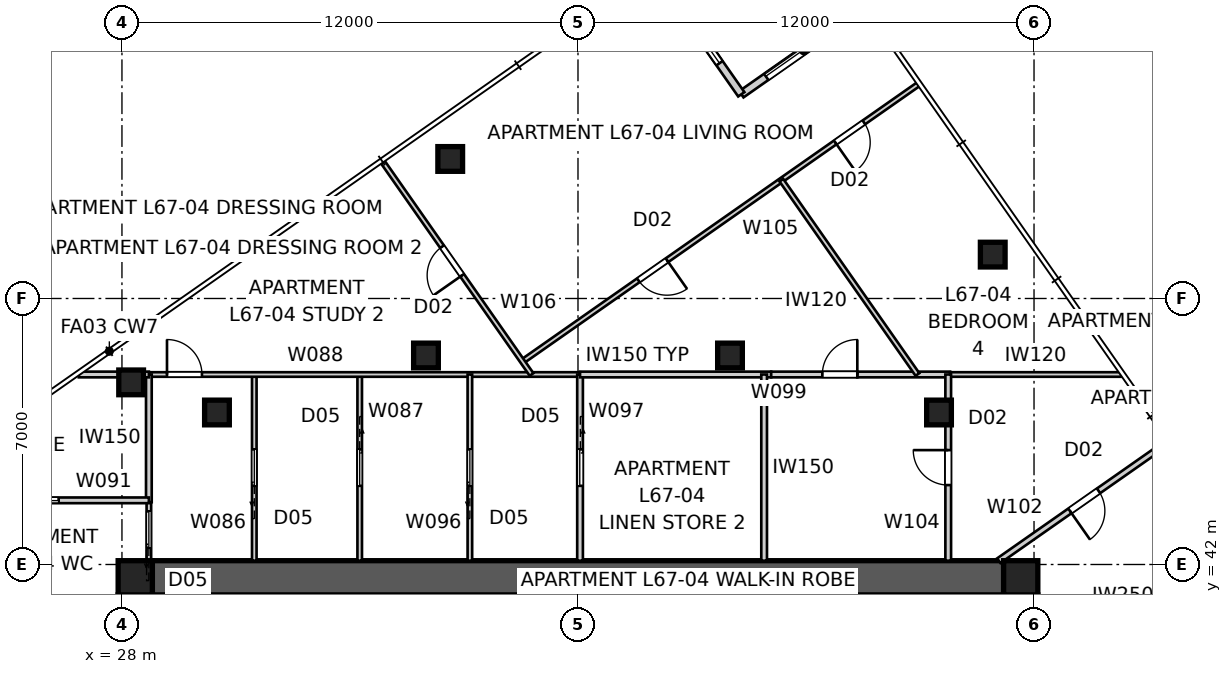
"""IFC4 building model, lengths in metres.
Left out: names, types, materials, properties, quantities, classifications, styles, units other than length and angle.
Written with IfcOpenShell. Run it as: python <this file> out.ifc"""

import sys

from ifc_helpers import new_model, si_unit, direction, frame, frame_2d, origin, origin_2d, place, context, subcontext, project, spatial, polyline, rectangle, outline, extrude, element, fill, save


model = new_model("IFC4")
c1 = context("Model", 3, precision=1e-05, world=origin(), true_north=direction((0.0, 1.0)))
c2 = subcontext(c1, "Body", "Model", "MODEL_VIEW")
j1 = project(units=[si_unit("LENGTHUNIT", "METRE"), si_unit("PLANEANGLEUNIT", "RADIAN")], contexts=[c1])
p1 = place(None, origin())
s1 = spatial("IfcSite", under=j1, at=p1, CompositionType="ELEMENT")
p2 = place(p1, origin())
s2 = spatial("IfcBuilding", under=s1, at=p2, CompositionType="ELEMENT")
p3 = place(p2, frame((0.0, 0.0, 243.8)))
s3 = spatial("IfcBuildingStorey", under=s2, at=p3, CompositionType="ELEMENT", Elevation=243.8)
p4 = place(p3, frame((28.8, 41.65, 0.0), z_axis=(0.0, 0.0, 1.0), x_axis=(1.0, 0.0, 0.0)))
e1 = element("IfcWall", 1, at=p4, inside=s3, PredefinedType="SHEAR", context=c2, shape_type="SweptSolid", body=[
    extrude(outline(polyline([(0.0, -0.45), (22.4, -0.45), (22.4, -0.025), (22.85, -0.025), (22.85, 0.025), (22.4, 0.025), (22.4, 0.45), (0.0, 0.45), (0.0, 0.025), (-0.45, 0.025), (-0.45, -0.025), (0.0, -0.025), (0.0, -0.45)])), origin(), (0.0, 0.0, 1.0), 3.4),
])
p5 = place(p3, frame((51.65, 18.8, 0.0), z_axis=(0.0, 0.0, 1.0), x_axis=(0.0, 1.0, 0.0)))
e2 = element("IfcWall", 2, at=p5, inside=s3, PredefinedType="SHEAR", context=c2, shape_type="SweptSolid", body=[
    extrude(outline(polyline([(0.0, -0.45), (22.4, -0.45), (22.4, -0.025), (22.85, -0.025), (22.85, 0.025), (22.4, 0.025), (22.4, 0.45), (0.0, 0.45), (0.0, 0.025), (-0.45, 0.025), (-0.45, -0.025), (0.0, -0.025), (0.0, -0.45)])), origin(), (0.0, 0.0, 1.0), 3.4),
])
p6 = place(p5, frame((11.14, 0.0, 0.0)))
e3 = element("IfcOpeningElement", 3, at=p6, cuts=e2, PredefinedType="OPENING", context=c2, shape_type="SweptSolid", body=[
    extrude(rectangle(XDim=1.02, YDim=2.4, at=frame_2d((0.51, 1.2))), frame((0.0, 0.46, 0.0), z_axis=(0.0, -1.0, 0.0), x_axis=(1.0, 0.0, 0.0)), (0.0, 0.0, 1.0), 0.92),
])
p7 = place(p3, frame((28.35, 41.2, 0.0), z_axis=(0.0, 0.0, 1.0), x_axis=(0.0, -1.0, 0.0)))
e4 = element("IfcWall", 4, at=p7, inside=s3, PredefinedType="SHEAR", context=c2, shape_type="SweptSolid", body=[
    extrude(outline(polyline([(0.0, -0.45), (22.4, -0.45), (22.4, -0.025), (22.85, -0.025), (22.85, 0.025), (22.4, 0.025), (22.4, 0.45), (0.0, 0.45), (0.0, 0.025), (-0.45, 0.025), (-0.45, -0.025), (0.0, -0.025), (0.0, -0.45)])), origin(), (0.0, 0.0, 1.0), 3.4),
])
p8 = place(p7, frame((11.14, 0.0, 0.0)))
e5 = element("IfcOpeningElement", 5, at=p8, cuts=e4, PredefinedType="OPENING", context=c2, shape_type="SweptSolid", body=[
    extrude(rectangle(XDim=1.02, YDim=2.4, at=frame_2d((0.51, 1.2))), frame((0.0, 0.46, 0.0), z_axis=(0.0, -1.0, 0.0), x_axis=(1.0, 0.0, 0.0)), (0.0, 0.0, 1.0), 0.92),
])
for number, where, z_axis, x_axis in (
    (6, (51.65, 41.65, 0.0), (0.0, 0.0, 1.0), (1.0, 0.0, 0.0)),
    (7, (28.35, 41.65, 0.0), (0.0, 0.0, 1.0), (1.0, 0.0, 0.0)),
):
    element("IfcColumn", number, at=place(p3, frame(where, z_axis=z_axis, x_axis=x_axis)), inside=s3, PredefinedType="COLUMN", context=c2, shape_type="SweptSolid", body=[
        extrude(rectangle(XDim=0.9, YDim=0.9, at=origin_2d()), origin(), (0.0, 0.0, 1.0), 3.4),
    ])
for number, where, z_axis, x_axis in (
    (8, (50.914, 50.155, 0.0), (0.0, 0.0, 1.0), (1.0, 0.0, 0.0)),
    (9, (36.638, 52.672, 0.0), (0.0, 0.0, 1.0), (1.0, 0.0, 0.0)),
    (10, (28.242, 46.793, 0.0), (0.0, 0.0, 1.0), (1.0, 0.0, 0.0)),
    (11, (49.5, 46.0, 0.0), (0.0, 0.0, 1.0), (1.0, 0.0, 0.0)),
    (12, (44.0, 47.5, 0.0), (0.0, 0.0, 1.0), (1.0, 0.0, 0.0)),
    (13, (36.0, 47.5, 0.0), (0.0, 0.0, 1.0), (1.0, 0.0, 0.0)),
    (14, (30.5, 46.0, 0.0), (0.0, 0.0, 1.0), (1.0, 0.0, 0.0)),
):
    element("IfcColumn", number, at=place(p3, frame(where, z_axis=z_axis, x_axis=x_axis)), inside=s3, PredefinedType="COLUMN", context=c2, shape_type="SweptSolid", body=[
        extrude(rectangle(XDim=0.65, YDim=0.65, at=origin_2d()), origin(), (0.0, 0.0, 1.0), 3.4),
    ])
p9 = place(p3, frame((47.574, 56.667, 0.0), z_axis=(0.0, 0.0, 1.0), x_axis=(-0.819165963305, -0.573556557423, 0.0)))
e15 = element("IfcWall", 15, at=p9, inside=s3, PredefinedType="SOLIDWALL", context=c2, shape_type="SweptSolid", body=[
    extrude(rectangle(XDim=4.0, YDim=0.2, at=frame_2d((2.0, 0.0))), origin(), (0.0, 0.0, 1.0), 3.25),
])
p10 = place(p9, frame((0.8, 0.0, 0.0)))
e16 = element("IfcOpeningElement", 16, at=p10, cuts=e15, PredefinedType="OPENING", context=c2, shape_type="SweptSolid", body=[
    extrude(rectangle(XDim=2.4, YDim=2.1, at=frame_2d((1.2, 1.05))), frame((0.0, 0.11, 0.0), z_axis=(0.0, -1.0, 0.0), x_axis=(1.0, 0.0, 0.0)), (0.0, 0.0, 1.0), 0.22),
])
p11 = place(p3, frame((44.298, 54.373, 0.0), z_axis=(0.0, 0.0, 1.0), x_axis=(-0.573597512525, 0.819137286189, 0.0)))
e17 = element("IfcWall", 17, at=p11, inside=s3, PredefinedType="SOLIDWALL", context=c2, shape_type="SweptSolid", body=[
    extrude(rectangle(XDim=4.0, YDim=0.2, at=frame_2d((2.0, 0.0))), origin(), (0.0, 0.0, 1.0), 3.25),
])
p12 = place(p11, frame((1.0, 0.0, 0.45)))
e18 = element("IfcOpeningElement", 18, at=p12, cuts=e17, PredefinedType="OPENING", context=c2, shape_type="SweptSolid", body=[
    extrude(rectangle(XDim=2.0, YDim=1.8, at=frame_2d((1.0, 0.9))), frame((0.0, 0.11, 0.0), z_axis=(0.0, -1.0, 0.0), x_axis=(1.0, 0.0, 0.0)), (0.0, 0.0, 1.0), 0.22),
])
p13 = place(p3, frame((57.612, 42.332, 0.0), z_axis=(0.0, 0.0, 1.0), x_axis=(-0.819161528122, -0.573562891796, 0.0)))
e19 = element("IfcWall", 19, at=p13, inside=s3, PredefinedType="PARTITIONING", context=c2, shape_type="SweptSolid", body=[
    extrude(rectangle(XDim=6.681, YDim=0.25, at=frame_2d((3.341, 0.0))), origin(), (0.0, 0.0, 1.0), 3.25),
])
p14 = place(p3, frame((31.482, 42.1, 0.0), z_axis=(0.0, 0.0, 1.0), x_axis=(0.0, 1.0, 0.0)))
e20 = element("IfcWall", 20, at=p14, inside=s3, PredefinedType="PARTITIONING", context=c2, shape_type="SweptSolid", body=[
    extrude(rectangle(XDim=4.9, YDim=0.12, at=frame_2d((2.45, 0.0))), origin(), (0.0, 0.0, 1.0), 3.25),
])
p15 = place(p14, frame((1.97, 0.0, 0.0)))
e21 = element("IfcOpeningElement", 21, at=p15, cuts=e20, PredefinedType="OPENING", context=c2, shape_type="SweptSolid", body=[
    extrude(rectangle(XDim=0.96, YDim=2.1, at=frame_2d((0.48, 1.05))), frame((0.0, 0.07, 0.0), z_axis=(0.0, -1.0, 0.0), x_axis=(1.0, 0.0, 0.0)), (0.0, 0.0, 1.0), 0.14),
])
p16 = place(p3, frame((34.256, 47.0, 0.0), z_axis=(0.0, 0.0, 1.0), x_axis=(0.0, -1.0, 0.0)))
e22 = element("IfcWall", 22, at=p16, inside=s3, PredefinedType="PARTITIONING", context=c2, shape_type="SweptSolid", body=[
    extrude(rectangle(XDim=4.9, YDim=0.12, at=frame_2d((2.45, 0.0))), origin(), (0.0, 0.0, 1.0), 2.796),
])
p17 = place(p16, frame((1.97, 0.0, 0.0)))
e23 = element("IfcOpeningElement", 23, at=p17, cuts=e22, PredefinedType="OPENING", context=c2, shape_type="SweptSolid", body=[
    extrude(rectangle(XDim=0.96, YDim=2.1, at=frame_2d((0.48, 1.05))), frame((0.0, 0.07, 0.0), z_axis=(0.0, -1.0, 0.0), x_axis=(1.0, 0.0, 0.0)), (0.0, 0.0, 1.0), 0.14),
])
p18 = place(p3, frame((28.708, 47.0, 0.0), z_axis=(0.0, 0.0, 1.0), x_axis=(1.0, 0.0, 0.0)))
e24 = element("IfcWall", 24, at=p18, inside=s3, PredefinedType="PARTITIONING", context=c2, shape_type="SweptSolid", body=[
    extrude(rectangle(XDim=11.346, YDim=0.12, at=frame_2d((5.673, 0.0))), origin(), (0.0, 0.0, 1.0), 2.55),
])
p19 = place(p18, frame((0.477, 0.0, 0.0)))
e25 = element("IfcOpeningElement", 25, at=p19, cuts=e24, PredefinedType="OPENING", context=c2, shape_type="SweptSolid", body=[
    extrude(rectangle(XDim=0.92, YDim=2.34, at=frame_2d((0.46, 1.17))), frame((0.0, 0.07, 0.0), z_axis=(0.0, -1.0, 0.0), x_axis=(1.0, 0.0, 0.0)), (0.0, 0.0, 1.0), 0.14),
])
p20 = place(p3, frame((28.708, 41.18, 0.0), z_axis=(0.0, 0.0, 1.0), x_axis=(0.0, 1.0, 0.0)))
e26 = element("IfcWall", 26, at=p20, inside=s3, PredefinedType="PARTITIONING", context=c2, shape_type="SweptSolid", body=[
    extrude(rectangle(XDim=2.458, YDim=0.12, at=frame_2d((1.229, 0.0))), origin(), (0.0, 0.0, 1.0), 3.25),
])
p21 = place(p20, frame((1.259, 0.0, 0.0)))
e27 = element("IfcOpeningElement", 27, at=p21, cuts=e26, PredefinedType="OPENING", context=c2, shape_type="SweptSolid", body=[
    extrude(rectangle(XDim=0.96, YDim=2.1, at=frame_2d((0.48, 1.05))), frame((0.0, 0.07, 0.0), z_axis=(0.0, -1.0, 0.0), x_axis=(1.0, 0.0, 0.0)), (0.0, 0.0, 1.0), 0.14),
])
p22 = place(p3, frame((28.708, 43.638, 0.0), z_axis=(0.0, 0.0, 1.0), x_axis=(0.0, 1.0, 0.0)))
e28 = element("IfcWall", 28, at=p22, inside=s3, PredefinedType="SOLIDWALL", context=c2, shape_type="SweptSolid", body=[
    extrude(rectangle(XDim=3.362, YDim=0.15, at=frame_2d((1.681, 0.0))), origin(), (0.0, 0.0, 1.0), 3.25),
])
p23 = place(p3, frame((23.0, 43.688, 0.0), z_axis=(0.0, 0.0, 1.0), x_axis=(1.0, 0.0, 0.0)))
e29 = element("IfcWall", 29, at=p23, inside=s3, PredefinedType="SOLIDWALL", context=c2, shape_type="SweptSolid", body=[
    extrude(rectangle(XDim=5.708, YDim=0.15, at=frame_2d((2.854, 0.0))), origin(), (0.0, 0.0, 1.0), 3.25),
])
p24 = place(p23, frame((2.374, 0.0, 0.0)))
e30 = element("IfcOpeningElement", 30, at=p24, cuts=e29, PredefinedType="OPENING", context=c2, shape_type="SweptSolid", body=[
    extrude(rectangle(XDim=0.96, YDim=2.1, at=frame_2d((0.48, 1.05))), frame((0.0, 0.085, 0.0), z_axis=(0.0, -1.0, 0.0), x_axis=(1.0, 0.0, 0.0)), (0.0, 0.0, 1.0), 0.17),
])
p25 = place(p3, frame((26.864, 47.0, 0.0), z_axis=(0.0, 0.0, 1.0), x_axis=(1.0, 0.0, 0.0)))
e31 = element("IfcWall", 31, at=p25, inside=s3, PredefinedType="SOLIDWALL", context=c2, shape_type="SweptSolid", body=[
    extrude(rectangle(XDim=1.844, YDim=0.15, at=frame_2d((0.922, 0.0))), origin(), (0.0, 0.0, 1.0), 3.25),
])
p26 = place(p3, frame((37.155, 42.1, 0.0), z_axis=(0.0, 0.0, 1.0), x_axis=(0.0, 1.0, 0.0)))
e32 = element("IfcWall", 32, at=p26, inside=s3, PredefinedType="PARTITIONING", context=c2, shape_type="SweptSolid", body=[
    extrude(rectangle(XDim=4.9, YDim=0.12, at=frame_2d((2.45, 0.0))), origin(), (0.0, 0.0, 1.0), 2.796),
])
p27 = place(p26, frame((1.97, 0.0, 0.0)))
e33 = element("IfcOpeningElement", 33, at=p27, cuts=e32, PredefinedType="OPENING", context=c2, shape_type="SweptSolid", body=[
    extrude(rectangle(XDim=0.96, YDim=2.1, at=frame_2d((0.48, 1.05))), frame((0.0, 0.07, 0.0), z_axis=(0.0, -1.0, 0.0), x_axis=(1.0, 0.0, 0.0)), (0.0, 0.0, 1.0), 0.14),
])
p28 = place(p3, frame((40.054, 47.0, 0.0), z_axis=(0.0, 0.0, 1.0), x_axis=(0.0, -1.0, 0.0)))
e34 = element("IfcWall", 34, at=p28, inside=s3, PredefinedType="SOLIDWALL", context=c2, shape_type="SweptSolid", body=[
    extrude(rectangle(XDim=4.9, YDim=0.15, at=frame_2d((2.45, 0.0))), origin(), (0.0, 0.0, 1.0), 2.796),
])
p29 = place(p28, frame((1.97, 0.0, 0.0)))
e35 = element("IfcOpeningElement", 35, at=p29, cuts=e34, PredefinedType="OPENING", context=c2, shape_type="SweptSolid", body=[
    extrude(rectangle(XDim=0.96, YDim=2.1, at=frame_2d((0.48, 1.05))), frame((0.0, 0.085, 0.0), z_axis=(0.0, -1.0, 0.0), x_axis=(1.0, 0.0, 0.0)), (0.0, 0.0, 1.0), 0.17),
])
p30 = place(p3, frame((40.054, 47.0, 0.0), z_axis=(0.0, 0.0, 1.0), x_axis=(1.0, 0.0, 0.0)))
e36 = element("IfcWall", 36, at=p30, inside=s3, PredefinedType="SOLIDWALL", context=c2, shape_type="SweptSolid", body=[
    extrude(rectangle(XDim=5.029, YDim=0.15, at=frame_2d((2.515, 0.0))), origin(), (0.0, 0.0, 1.0), 3.25),
])
p31 = place(p3, frame((45.083, 47.0, 0.0), z_axis=(0.0, 0.0, 1.0), x_axis=(1.0, 0.0, 0.0)))
e37 = element("IfcWall", 37, at=p31, inside=s3, PredefinedType="SOLIDWALL", context=c2, shape_type="SweptSolid", body=[
    extrude(rectangle(XDim=2.267, YDim=0.15, at=frame_2d((1.133, 0.0))), origin(), (0.0, 0.0, 1.0), 2.55),
])
p32 = place(p31, frame((1.347, 0.0, 0.0)))
e38 = element("IfcOpeningElement", 38, at=p32, cuts=e37, PredefinedType="OPENING", context=c2, shape_type="SweptSolid", body=[
    extrude(rectangle(XDim=0.92, YDim=2.34, at=frame_2d((0.46, 1.17))), frame((0.0, 0.085, 0.0), z_axis=(0.0, -1.0, 0.0), x_axis=(1.0, 0.0, 0.0)), (0.0, 0.0, 1.0), 0.17),
])
p33 = place(p3, frame((47.35, 47.0, 0.0), z_axis=(0.0, 0.0, 1.0), x_axis=(1.0, 0.0, 0.0)))
e39 = element("IfcWall", 39, at=p33, inside=s3, PredefinedType="SOLIDWALL", context=c2, shape_type="SweptSolid", body=[
    extrude(rectangle(XDim=2.442, YDim=0.15, at=frame_2d((1.221, 0.0))), origin(), (0.0, 0.0, 1.0), 3.25),
])
p34 = place(p3, frame((44.898, 47.0, 0.0), z_axis=(0.0, 0.0, 1.0), x_axis=(0.0, -1.0, 0.0)))
e40 = element("IfcWall", 40, at=p34, inside=s3, PredefinedType="SOLIDWALL", context=c2, shape_type="SweptSolid", body=[
    extrude(rectangle(XDim=4.9, YDim=0.15, at=frame_2d((2.45, 0.0))), origin(), (0.0, 0.0, 1.0), 3.25),
])
p35 = place(p3, frame((55.537, 45.226, 0.0), z_axis=(0.0, 0.0, 1.0), x_axis=(-0.819158250207, -0.573567573279, 0.0)))
e41 = element("IfcWall", 41, at=p35, inside=s3, PredefinedType="SOLIDWALL", context=c2, shape_type="SweptSolid", body=[
    extrude(rectangle(XDim=5.45, YDim=0.15, at=frame_2d((2.725, 0.0))), origin(), (0.0, 0.0, 1.0), 3.25),
])
p36 = place(p35, frame((2.245, 0.0, 0.0)))
e42 = element("IfcOpeningElement", 42, at=p36, cuts=e41, PredefinedType="OPENING", context=c2, shape_type="SweptSolid", body=[
    extrude(rectangle(XDim=0.92, YDim=2.34, at=frame_2d((0.46, 1.17))), frame((0.0, 0.085, 0.0), z_axis=(0.0, -1.0, 0.0), x_axis=(1.0, 0.0, 0.0)), (0.0, 0.0, 1.0), 0.17),
])
p37 = place(p3, frame((49.792, 47.0, 0.0), z_axis=(0.0, 0.0, 1.0), x_axis=(1.0, 0.0, 0.0)))
e43 = element("IfcWall", 43, at=p37, inside=s3, PredefinedType="PARTITIONING", context=c2, shape_type="SweptSolid", body=[
    extrude(rectangle(XDim=4.502, YDim=0.12, at=frame_2d((2.251, 0.0))), origin(), (0.0, 0.0, 1.0), 3.25),
])
p38 = place(p3, frame((49.742, 42.1, 0.0), z_axis=(0.0, 0.0, 1.0), x_axis=(0.0, 1.0, 0.0)))
e44 = element("IfcWall", 44, at=p38, inside=s3, PredefinedType="SOLIDWALL", context=c2, shape_type="SweptSolid", body=[
    extrude(rectangle(XDim=4.9, YDim=0.15, at=frame_2d((2.45, 0.0))), origin(), (0.0, 0.0, 1.0), 3.25),
])
p39 = place(p38, frame((1.99, 0.0, 0.0)))
e45 = element("IfcOpeningElement", 45, at=p39, cuts=e44, PredefinedType="OPENING", context=c2, shape_type="SweptSolid", body=[
    extrude(rectangle(XDim=0.92, YDim=2.34, at=frame_2d((0.46, 1.17))), frame((0.0, 0.085, 0.0), z_axis=(0.0, -1.0, 0.0), x_axis=(1.0, 0.0, 0.0)), (0.0, 0.0, 1.0), 0.17),
])
p40 = place(p3, frame((48.949, 54.633, 0.0), z_axis=(0.0, 0.0, 1.0), x_axis=(-0.819155207289, -0.573571919092, 0.0)))
e46 = element("IfcWall", 46, at=p40, inside=s3, PredefinedType="PARTITIONING", context=c2, shape_type="SweptSolid", body=[
    extrude(rectangle(XDim=12.71, YDim=0.12, at=frame_2d((6.355, 0.0))), origin(), (0.0, 0.0, 1.0), 3.25),
])
p41 = place(p40, frame((8.066, 0.0, 0.0)))
e47 = element("IfcOpeningElement", 47, at=p41, cuts=e46, PredefinedType="OPENING", context=c2, shape_type="SweptSolid", body=[
    extrude(rectangle(XDim=0.92, YDim=2.34, at=frame_2d((0.46, 1.17))), frame((0.0, 0.07, 0.0), z_axis=(0.0, -1.0, 0.0), x_axis=(1.0, 0.0, 0.0)), (0.0, 0.0, 1.0), 0.14),
])
p42 = place(p40, frame((1.741, 0.0, 0.0)))
e48 = element("IfcOpeningElement", 48, at=p42, cuts=e46, PredefinedType="OPENING", context=c2, shape_type="SweptSolid", body=[
    extrude(rectangle(XDim=0.92, YDim=2.34, at=frame_2d((0.46, 1.17))), frame((0.0, 0.07, 0.0), z_axis=(0.0, -1.0, 0.0), x_axis=(1.0, 0.0, 0.0)), (0.0, 0.0, 1.0), 0.14),
])
p43 = place(p3, frame((38.778, 47.0, 0.0), z_axis=(0.0, 0.0, 1.0), x_axis=(-0.57357503053, 0.819153028653, 0.0)))
e49 = element("IfcWall", 49, at=p43, inside=s3, PredefinedType="PARTITIONING", context=c2, shape_type="SweptSolid", body=[
    extrude(rectangle(XDim=6.834, YDim=0.12, at=frame_2d((3.417, 0.0))), origin(), (0.0, 0.0, 1.0), 3.25),
])
p44 = place(p43, frame((3.186, 0.0, 0.0)))
e50 = element("IfcOpeningElement", 50, at=p44, cuts=e49, PredefinedType="OPENING", context=c2, shape_type="SweptSolid", body=[
    extrude(rectangle(XDim=0.92, YDim=2.34, at=frame_2d((0.46, 1.17))), frame((0.0, 0.07, 0.0), z_axis=(0.0, -1.0, 0.0), x_axis=(1.0, 0.0, 0.0)), (0.0, 0.0, 1.0), 0.14),
])
p45 = place(p3, frame((48.932, 47.0, 0.0), z_axis=(0.0, 0.0, 1.0), x_axis=(-0.573569946952, 0.819156588177, 0.0)))
e51 = element("IfcWall", 51, at=p45, inside=s3, PredefinedType="PARTITIONING", context=c2, shape_type="SweptSolid", body=[
    extrude(rectangle(XDim=6.243, YDim=0.12, at=frame_2d((3.122, 0.0))), origin(), (0.0, 0.0, 1.0), 3.25),
])
p46 = place(p10, origin())
e52 = element("IfcDoor", 52, at=p46, inside=s3, OperationType="SLIDING_TO_LEFT", PredefinedType="DOOR", context=c2, shape_type="SweptSolid", body=[
    extrude(rectangle(XDim=2.4, YDim=2.1, at=frame_2d((1.2, 1.05))), frame((0.0, 0.025, 0.0), z_axis=(0.0, -1.0, 0.0), x_axis=(1.0, 0.0, 0.0)), (0.0, 0.0, 1.0), 0.05),
])
fill(e16, e52)
p47 = place(p12, origin())
e53 = element("IfcWindow", 53, at=p47, inside=s3, PartitioningType="SINGLE_PANEL", PredefinedType="WINDOW", context=c2, shape_type="SweptSolid", body=[
    extrude(rectangle(XDim=2.0, YDim=1.8, at=frame_2d((1.0, 0.9))), frame((0.0, 0.03, 0.0), z_axis=(0.0, -1.0, 0.0), x_axis=(1.0, 0.0, 0.0)), (0.0, 0.0, 1.0), 0.06),
])
fill(e18, e53)
p48 = place(p24, origin())
e54 = element("IfcDoor", 54, at=p48, inside=s3, OperationType="SLIDING_TO_LEFT", PredefinedType="DOOR", context=c2, shape_type="SweptSolid", body=[
    extrude(rectangle(XDim=0.96, YDim=2.1, at=frame_2d((0.48, 1.05))), frame((0.0, 0.025, 0.0), z_axis=(0.0, -1.0, 0.0), x_axis=(1.0, 0.0, 0.0)), (0.0, 0.0, 1.0), 0.05),
])
fill(e30, e54)
p49 = place(p21, origin())
e55 = element("IfcDoor", 55, at=p49, inside=s3, OperationType="SLIDING_TO_LEFT", PredefinedType="DOOR", context=c2, shape_type="SweptSolid", body=[
    extrude(rectangle(XDim=0.96, YDim=2.1, at=frame_2d((0.48, 1.05))), frame((0.0, 0.025, 0.0), z_axis=(0.0, -1.0, 0.0), x_axis=(1.0, 0.0, 0.0)), (0.0, 0.0, 1.0), 0.05),
])
fill(e27, e55)
p50 = place(p15, origin())
e56 = element("IfcDoor", 56, at=p50, inside=s3, OperationType="SLIDING_TO_LEFT", PredefinedType="DOOR", context=c2, shape_type="SweptSolid", body=[
    extrude(rectangle(XDim=0.96, YDim=2.1, at=frame_2d((0.48, 1.05))), frame((0.0, 0.025, 0.0), z_axis=(0.0, -1.0, 0.0), x_axis=(1.0, 0.0, 0.0)), (0.0, 0.0, 1.0), 0.05),
])
fill(e21, e56)
p51 = place(p19, origin())
e57 = element("IfcDoor", 57, at=p51, inside=s3, OperationType="SINGLE_SWING_LEFT", PredefinedType="DOOR", context=c2, shape_type="SweptSolid", body=[
    extrude(rectangle(XDim=0.92, YDim=2.34, at=frame_2d((0.46, 1.17))), frame((0.0, 0.025, 0.0), z_axis=(0.0, -1.0, 0.0), x_axis=(1.0, 0.0, 0.0)), (0.0, 0.0, 1.0), 0.05),
])
fill(e25, e57)
p52 = place(p17, origin())
e58 = element("IfcDoor", 58, at=p52, inside=s3, OperationType="SLIDING_TO_LEFT", PredefinedType="DOOR", context=c2, shape_type="SweptSolid", body=[
    extrude(rectangle(XDim=0.96, YDim=2.1, at=frame_2d((0.48, 1.05))), frame((0.0, 0.025, 0.0), z_axis=(0.0, -1.0, 0.0), x_axis=(1.0, 0.0, 0.0)), (0.0, 0.0, 1.0), 0.05),
])
fill(e23, e58)
p53 = place(p44, origin())
e59 = element("IfcDoor", 59, at=p53, inside=s3, OperationType="SINGLE_SWING_LEFT", PredefinedType="DOOR", context=c2, shape_type="SweptSolid", body=[
    extrude(rectangle(XDim=0.92, YDim=2.34, at=frame_2d((0.46, 1.17))), frame((0.0, 0.025, 0.0), z_axis=(0.0, -1.0, 0.0), x_axis=(1.0, 0.0, 0.0)), (0.0, 0.0, 1.0), 0.05),
])
fill(e50, e59)
p54 = place(p27, origin())
e60 = element("IfcDoor", 60, at=p54, inside=s3, OperationType="SLIDING_TO_LEFT", PredefinedType="DOOR", context=c2, shape_type="SweptSolid", body=[
    extrude(rectangle(XDim=0.96, YDim=2.1, at=frame_2d((0.48, 1.05))), frame((0.0, 0.025, 0.0), z_axis=(0.0, -1.0, 0.0), x_axis=(1.0, 0.0, 0.0)), (0.0, 0.0, 1.0), 0.05),
])
fill(e33, e60)
p55 = place(p41, origin())
e61 = element("IfcDoor", 61, at=p55, inside=s3, OperationType="SINGLE_SWING_LEFT", PredefinedType="DOOR", context=c2, shape_type="SweptSolid", body=[
    extrude(rectangle(XDim=0.92, YDim=2.34, at=frame_2d((0.46, 1.17))), frame((0.0, 0.025, 0.0), z_axis=(0.0, -1.0, 0.0), x_axis=(1.0, 0.0, 0.0)), (0.0, 0.0, 1.0), 0.05),
])
fill(e47, e61)
p56 = place(p42, origin())
e62 = element("IfcDoor", 62, at=p56, inside=s3, OperationType="SINGLE_SWING_RIGHT", PredefinedType="DOOR", context=c2, shape_type="SweptSolid", body=[
    extrude(rectangle(XDim=0.92, YDim=2.34, at=frame_2d((0.46, 1.17))), frame((0.0, 0.025, 0.0), z_axis=(0.0, -1.0, 0.0), x_axis=(1.0, 0.0, 0.0)), (0.0, 0.0, 1.0), 0.05),
])
fill(e48, e62)
p57 = place(p29, origin())
e63 = element("IfcDoor", 63, at=p57, inside=s3, OperationType="SLIDING_TO_LEFT", PredefinedType="DOOR", context=c2, shape_type="SweptSolid", body=[
    extrude(rectangle(XDim=0.96, YDim=2.1, at=frame_2d((0.48, 1.05))), frame((0.0, 0.025, 0.0), z_axis=(0.0, -1.0, 0.0), x_axis=(1.0, 0.0, 0.0)), (0.0, 0.0, 1.0), 0.05),
])
fill(e35, e63)
p58 = place(p32, origin())
e64 = element("IfcDoor", 64, at=p58, inside=s3, OperationType="SINGLE_SWING_RIGHT", PredefinedType="DOOR", context=c2, shape_type="SweptSolid", body=[
    extrude(rectangle(XDim=0.92, YDim=2.34, at=frame_2d((0.46, 1.17))), frame((0.0, 0.025, 0.0), z_axis=(0.0, -1.0, 0.0), x_axis=(1.0, 0.0, 0.0)), (0.0, 0.0, 1.0), 0.05),
])
fill(e38, e64)
p59 = place(p39, origin())
e65 = element("IfcDoor", 65, at=p59, inside=s3, OperationType="SINGLE_SWING_RIGHT", PredefinedType="DOOR", context=c2, shape_type="SweptSolid", body=[
    extrude(rectangle(XDim=0.92, YDim=2.34, at=frame_2d((0.46, 1.17))), frame((0.0, 0.025, 0.0), z_axis=(0.0, -1.0, 0.0), x_axis=(1.0, 0.0, 0.0)), (0.0, 0.0, 1.0), 0.05),
])
fill(e45, e65)
p60 = place(p36, origin())
e66 = element("IfcDoor", 66, at=p60, inside=s3, OperationType="SINGLE_SWING_RIGHT", PredefinedType="DOOR", context=c2, shape_type="SweptSolid", body=[
    extrude(rectangle(XDim=0.92, YDim=2.34, at=frame_2d((0.46, 1.17))), frame((0.0, 0.025, 0.0), z_axis=(0.0, -1.0, 0.0), x_axis=(1.0, 0.0, 0.0)), (0.0, 0.0, 1.0), 0.05),
])
fill(e42, e66)
save(model, sys.argv[1])
